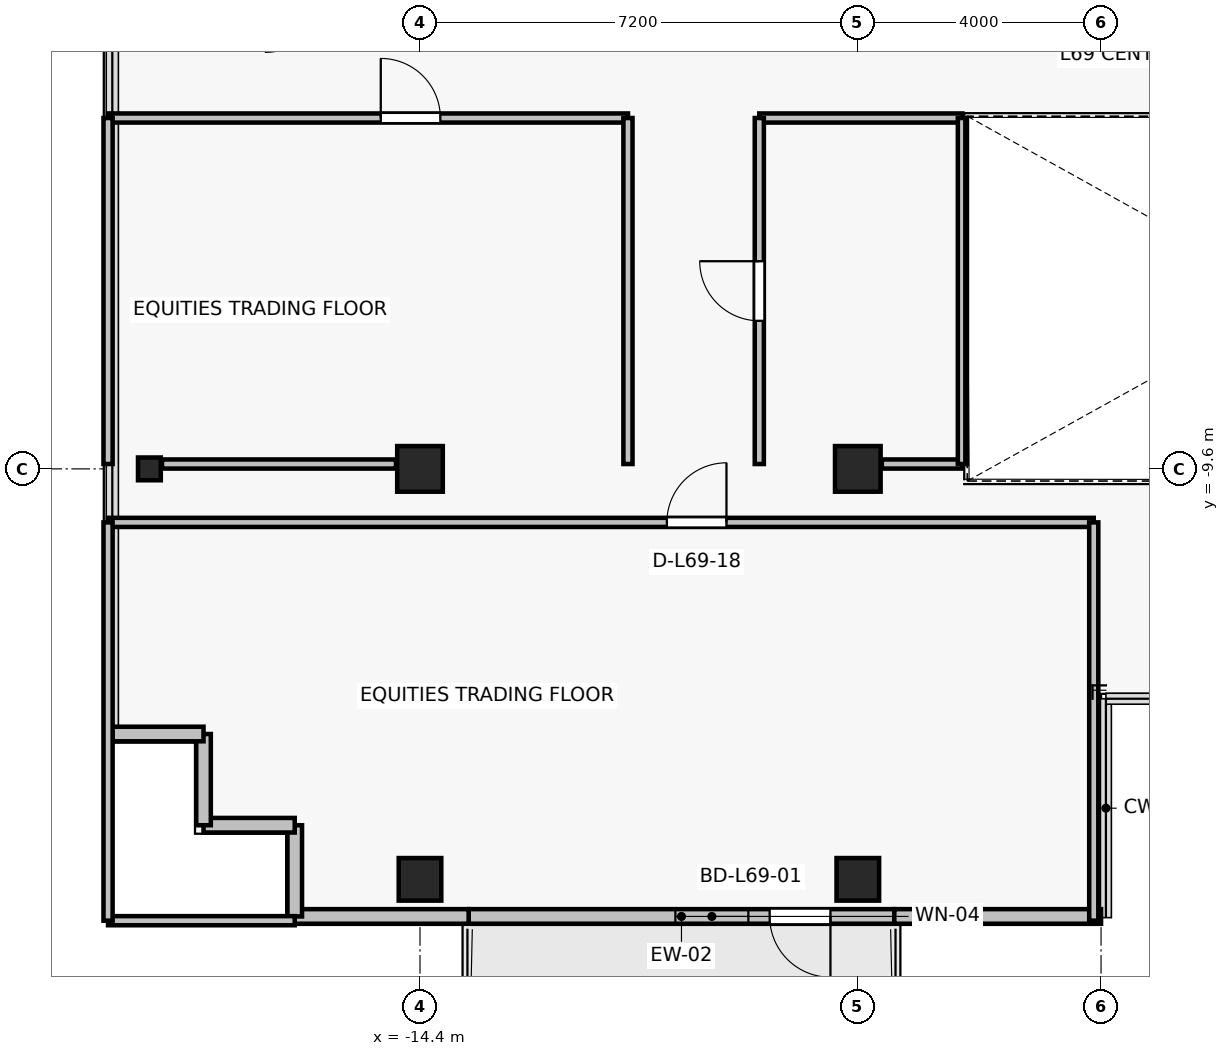
"""IFC4 building model, lengths in metres.
Left out: names, types, materials, properties, quantities, classifications, styles, units other than length and angle.
Written with IfcOpenShell. Run it as: python <this file> out.ifc"""

import sys

from ifc_helpers import new_model, si_unit, direction, frame, frame_2d, origin, origin_2d, place, context, subcontext, project, spatial, rectangle, i_section, extrude, source, transform, mapped, element, fill, save


model = new_model("IFC4")
c1 = context("Model", 3, precision=1e-05, world=origin(), true_north=direction((0.0, 1.0)))
c2 = subcontext(c1, "Body", "Model", "MODEL_VIEW")
j1 = project(units=[si_unit("LENGTHUNIT", "METRE"), si_unit("PLANEANGLEUNIT", "RADIAN")], contexts=[c1])
p1 = place(None, origin())
s1 = spatial("IfcSite", under=j1, at=p1, CompositionType="ELEMENT")
p2 = place(p1, origin())
s2 = spatial("IfcBuilding", under=s1, at=p2, CompositionType="ELEMENT")
p3 = place(p2, frame((0.0, 0.0, 245.2)))
s3 = spatial("IfcBuildingStorey", under=s2, at=p3, CompositionType="ELEMENT", Elevation=245.2)
for number, where, z_axis, x_axis in (
    (1, (-14.4, -9.6, 0.0), (0.0, 0.0, 1.0), (1.0, 0.0, 0.0)),
    (2, (-7.2, -9.6, 0.0), (0.0, 0.0, 1.0), (1.0, 0.0, 0.0)),
):
    element("IfcColumn", number, at=place(p3, frame(where, z_axis=z_axis, x_axis=x_axis)), inside=s3, PredefinedType="COLUMN", context=c2, shape_type="SweptSolid", body=[
        extrude(rectangle(XDim=0.75, YDim=0.75, at=origin_2d()), origin(), (0.0, 0.0, 1.0), 3.3),
    ])
for number, where, z_axis, x_axis in (
    (3, (-14.4, -16.35, 0.0), (0.0, 0.0, 1.0), (1.0, 0.0, 0.0)),
    (4, (-7.2, -16.35, 0.0), (0.0, 0.0, 1.0), (1.0, 0.0, 0.0)),
):
    element("IfcColumn", number, at=place(p3, frame(where, z_axis=z_axis, x_axis=x_axis)), inside=s3, PredefinedType="COLUMN", context=c2, shape_type="SweptSolid", body=[
        extrude(rectangle(XDim=0.7, YDim=0.7, at=origin_2d()), origin(), (0.0, 0.0, 1.0), 3.3),
    ])
p4 = place(p3, frame((-18.85, -9.6, 0.0), z_axis=(0.0, 0.0, 1.0), x_axis=(1.0, 0.0, 0.0)))
e5 = element("IfcColumn", 5, at=p4, inside=s3, PredefinedType="COLUMN", context=c2, shape_type="SweptSolid", body=[
    extrude(i_section(OverallWidth=0.375, OverallDepth=0.375, WebThickness=0.017, FlangeThickness=0.027, FilletRadius=0.015, at=origin_2d()), origin(), (0.0, 0.0, 1.0), 3.3),
])
p5 = place(p3, frame((-6.6, -16.96, 0.0), z_axis=(0.0, 0.0, 1.0), x_axis=(-1.0, 0.0, 0.0)))
e6 = element("IfcWall", 6, at=p5, inside=s3, PredefinedType="SOLIDWALL", context=c2, shape_type="SweptSolid", body=[
    extrude(rectangle(XDim=7.0, YDim=0.24, at=frame_2d((3.5, 0.0))), origin(), (0.0, 0.0, 1.0), 2.665),
])
p6 = place(p5, frame((1.05, 0.0, 0.0)))
e7 = element("IfcOpeningElement", 7, at=p6, cuts=e6, PredefinedType="OPENING", context=c2, shape_type="SweptSolid", body=[
    extrude(rectangle(XDim=1.0, YDim=2.2, at=frame_2d((0.5, 1.1))), frame((0.0, 0.13, 0.0), z_axis=(0.0, -1.0, 0.0), x_axis=(1.0, 0.0, 0.0)), (0.0, 0.0, 1.0), 0.26),
])
p7 = place(p5, frame((2.4, 0.0, 0.85)))
e8 = element("IfcOpeningElement", 8, at=p7, cuts=e6, PredefinedType="OPENING", context=c2, shape_type="SweptSolid", body=[
    extrude(rectangle(XDim=1.2, YDim=1.5, at=frame_2d((0.6, 0.75))), frame((0.0, 0.13, 0.0), z_axis=(0.0, -1.0, 0.0), x_axis=(1.0, 0.0, 0.0)), (0.0, 0.0, 1.0), 0.26),
])
p8 = place(p3, frame((-6.6, -16.96, 0.0), z_axis=(0.0, 0.0, 1.0), x_axis=(1.0, 0.0, 0.0)))
e9 = element("IfcWall", 9, at=p8, inside=s3, PredefinedType="SOLIDWALL", context=c2, shape_type="SweptSolid", body=[
    extrude(rectangle(XDim=3.4, YDim=0.24, at=frame_2d((1.7, 0.0))), origin(), (0.0, 0.0, 1.0), 3.075),
])
p9 = place(p3, frame((-16.46, -16.96, 0.0), z_axis=(0.0, 0.0, 1.0), x_axis=(1.0, 0.0, 0.0)))
e10 = element("IfcWall", 10, at=p9, inside=s3, PredefinedType="SOLIDWALL", context=c2, shape_type="SweptSolid", body=[
    extrude(rectangle(XDim=2.86, YDim=0.24, at=frame_2d((1.43, 0.0))), origin(), (0.0, 0.0, 1.0), 2.665),
])
for number, where, z_axis, x_axis in (
    (11, (-16.46, -15.46, 0.0), (0.0, 0.0, 1.0), (0.0, -1.0, 0.0)),
    (12, (-17.96, -15.46, 0.0), (0.0, 0.0, 1.0), (1.0, 0.0, 0.0)),
    (13, (-17.96, -13.96, 0.0), (0.0, 0.0, 1.0), (0.0, -1.0, 0.0)),
    (14, (-19.46, -13.96, 0.0), (0.0, 0.0, 1.0), (1.0, 0.0, 0.0)),
):
    element("IfcWall", number, at=place(p3, frame(where, z_axis=z_axis, x_axis=x_axis)), inside=s3, PredefinedType="SOLIDWALL", context=c2, shape_type="SweptSolid", body=[
        extrude(rectangle(XDim=1.5, YDim=0.24, at=frame_2d((0.75, 0.0))), origin(), (0.0, 0.0, 1.0), 3.075),
    ])
p10 = place(p3, frame((-14.795, -9.52, 0.0), z_axis=(0.0, 0.0, 1.0), x_axis=(-1.0, 0.0, 0.0)))
e15 = element("IfcWall", 15, at=p10, inside=s3, PredefinedType="PARTITIONING", context=c2, shape_type="SweptSolid", body=[
    extrude(rectangle(XDim=3.848, YDim=0.15, at=frame_2d((1.924, 0.0))), origin(), (0.0, 0.0, 1.0), 2.615),
])
p11 = place(p3, frame((-19.53, -3.83, 0.0), z_axis=(0.0, 0.0, 1.0), x_axis=(1.0, 0.0, 0.0)))
e16 = element("IfcWall", 16, at=p11, inside=s3, PredefinedType="PARTITIONING", context=c2, shape_type="SweptSolid", body=[
    extrude(rectangle(XDim=8.55, YDim=0.15, at=frame_2d((4.275, 0.0))), origin(), (0.0, 0.0, 1.0), 2.615),
])
p12 = place(p11, frame((4.485, 0.0, 0.0)))
e17 = element("IfcOpeningElement", 17, at=p12, cuts=e16, PredefinedType="OPENING", context=c2, shape_type="SweptSolid", body=[
    extrude(rectangle(XDim=0.98, YDim=2.15, at=frame_2d((0.49, 1.075))), frame((0.0, 0.085, 0.0), z_axis=(0.0, -1.0, 0.0), x_axis=(1.0, 0.0, 0.0)), (0.0, 0.0, 1.0), 0.17),
])
p13 = place(p3, frame((-19.53, -9.52, 0.0), z_axis=(0.0, 0.0, 1.0), x_axis=(0.0, 1.0, 0.0)))
e18 = element("IfcWall", 18, at=p13, inside=s3, PredefinedType="PARTITIONING", context=c2, shape_type="SweptSolid", body=[
    extrude(rectangle(XDim=5.69, YDim=0.15, at=frame_2d((2.845, 0.0))), origin(), (0.0, 0.0, 1.0), 2.665),
])
p14 = place(p3, frame((-10.98, -3.83, 0.0), z_axis=(0.0, 0.0, 1.0), x_axis=(0.0, -1.0, 0.0)))
e19 = element("IfcWall", 19, at=p14, inside=s3, PredefinedType="PARTITIONING", context=c2, shape_type="SweptSolid", body=[
    extrude(rectangle(XDim=5.69, YDim=0.15, at=frame_2d((2.845, 0.0))), origin(), (0.0, 0.0, 1.0), 2.615),
])
p15 = place(p3, frame((-16.46, -17.03, 0.0), z_axis=(0.0, 0.0, 1.0), x_axis=(-1.0, 0.0, 0.0)))
e20 = element("IfcWall", 20, at=p15, inside=s3, PredefinedType="PARTITIONING", context=c2, shape_type="SweptSolid", body=[
    extrude(rectangle(XDim=3.07, YDim=0.15, at=frame_2d((1.535, 0.0))), origin(), (0.0, 0.0, 1.0), 2.665),
])
p16 = place(p3, frame((-19.53, -10.48, 0.0), z_axis=(0.0, 0.0, 1.0), x_axis=(1.0, 0.0, 0.0)))
e21 = element("IfcWall", 21, at=p16, inside=s3, PredefinedType="PARTITIONING", context=c2, shape_type="SweptSolid", body=[
    extrude(rectangle(XDim=16.21, YDim=0.15, at=frame_2d((8.105, 0.0))), origin(), (0.0, 0.0, 1.0), 2.615),
])
p17 = place(p16, frame((9.19, 0.0, 0.0)))
e22 = element("IfcOpeningElement", 22, at=p17, cuts=e21, PredefinedType="OPENING", context=c2, shape_type="SweptSolid", body=[
    extrude(rectangle(XDim=0.98, YDim=2.15, at=frame_2d((0.49, 1.075))), frame((0.0, 0.085, 0.0), z_axis=(0.0, -1.0, 0.0), x_axis=(1.0, 0.0, 0.0)), (0.0, 0.0, 1.0), 0.17),
])
p18 = place(p3, frame((-19.53, -17.03, 0.0), z_axis=(0.0, 0.0, 1.0), x_axis=(0.0, 1.0, 0.0)))
e23 = element("IfcWall", 23, at=p18, inside=s3, PredefinedType="PARTITIONING", context=c2, shape_type="SweptSolid", body=[
    extrude(rectangle(XDim=6.55, YDim=0.15, at=frame_2d((3.275, 0.0))), origin(), (0.0, 0.0, 1.0), 3.075),
])
p19 = place(p3, frame((-3.32, -10.48, 0.0), z_axis=(0.0, 0.0, 1.0), x_axis=(0.0, -1.0, 0.0)))
e24 = element("IfcWall", 24, at=p19, inside=s3, PredefinedType="PARTITIONING", context=c2, shape_type="SweptSolid", body=[
    extrude(rectangle(XDim=6.55, YDim=0.15, at=frame_2d((3.275, 0.0))), origin(), (0.0, 0.0, 1.0), 2.615),
])
p20 = place(p3, frame((-5.48, -9.52, 0.0), z_axis=(0.0, 0.0, 1.0), x_axis=(-1.0, 0.0, 0.0)))
e25 = element("IfcWall", 25, at=p20, inside=s3, PredefinedType="PARTITIONING", context=c2, shape_type="SweptSolid", body=[
    extrude(rectangle(XDim=1.325, YDim=0.15, at=frame_2d((0.663, 0.0))), origin(), (0.0, 0.0, 1.0), 2.615),
])
p21 = place(p3, frame((-8.82, -3.83, 0.0), z_axis=(0.0, 0.0, 1.0), x_axis=(1.0, 0.0, 0.0)))
e26 = element("IfcWall", 26, at=p21, inside=s3, PredefinedType="PARTITIONING", context=c2, shape_type="SweptSolid", body=[
    extrude(rectangle(XDim=3.34, YDim=0.15, at=frame_2d((1.67, 0.0))), origin(), (0.0, 0.0, 1.0), 2.615),
])
p22 = place(p3, frame((-8.82, -9.52, 0.0), z_axis=(0.0, 0.0, 1.0), x_axis=(0.0, 1.0, 0.0)))
e27 = element("IfcWall", 27, at=p22, inside=s3, PredefinedType="PARTITIONING", context=c2, shape_type="SweptSolid", body=[
    extrude(rectangle(XDim=5.69, YDim=0.15, at=frame_2d((2.845, 0.0))), origin(), (0.0, 0.0, 1.0), 2.615),
])
p23 = place(p22, frame((2.355, 0.0, 0.0)))
e28 = element("IfcOpeningElement", 28, at=p23, cuts=e27, PredefinedType="OPENING", context=c2, shape_type="SweptSolid", body=[
    extrude(rectangle(XDim=0.98, YDim=2.15, at=frame_2d((0.49, 1.075))), frame((0.0, 0.085, 0.0), z_axis=(0.0, -1.0, 0.0), x_axis=(1.0, 0.0, 0.0)), (0.0, 0.0, 1.0), 0.17),
])
p24 = place(p3, frame((-5.48, -3.83, 0.0), z_axis=(0.0, 0.0, 1.0), x_axis=(0.0, -1.0, 0.0)))
e29 = element("IfcWall", 29, at=p24, inside=s3, PredefinedType="PARTITIONING", context=c2, shape_type="SweptSolid", body=[
    extrude(rectangle(XDim=5.69, YDim=0.15, at=frame_2d((2.845, 0.0))), origin(), (0.0, 0.0, 1.0), 2.615),
])
m1 = source(origin(), c2, "Body", "SweptSolid", [
    extrude(rectangle(XDim=1.0, YDim=2.2, at=frame_2d((0.5, 1.1))), frame((0.0, 0.025, 0.0), z_axis=(0.0, -1.0, 0.0), x_axis=(1.0, 0.0, 0.0)), (0.0, 0.0, 1.0), 0.05),
])
p25 = place(p6, origin())
e30 = element("IfcDoor", 30, at=p25, inside=s3, OperationType="SINGLE_SWING_LEFT", PredefinedType="DOOR", context=c2, shape_type="MappedRepresentation", body=[
    mapped(m1, transform((0.0, 0.0, 0.0), x_axis=(1.0, 0.0, 0.0), y_axis=(0.0, 1.0, 0.0), z_axis=(0.0, 0.0, 1.0), scale=1.0)),
])
fill(e7, e30)
m2 = source(origin(), c2, "Body", "SweptSolid", [
    extrude(rectangle(XDim=1.2, YDim=1.5, at=frame_2d((0.6, 0.75))), frame((0.0, 0.03, 0.0), z_axis=(0.0, -1.0, 0.0), x_axis=(1.0, 0.0, 0.0)), (0.0, 0.0, 1.0), 0.06),
])
p26 = place(p7, origin())
e31 = element("IfcWindow", 31, at=p26, inside=s3, PartitioningType="SINGLE_PANEL", PredefinedType="WINDOW", context=c2, shape_type="MappedRepresentation", body=[
    mapped(m2, transform((0.0, 0.0, 0.0), x_axis=(1.0, 0.0, 0.0), y_axis=(0.0, 1.0, 0.0), z_axis=(0.0, 0.0, 1.0), scale=1.0)),
])
fill(e8, e31)
m3 = source(origin(), c2, "Body", "SweptSolid", [
    extrude(rectangle(XDim=0.98, YDim=2.15, at=frame_2d((0.49, 1.075))), frame((0.0, 0.025, 0.0), z_axis=(0.0, -1.0, 0.0), x_axis=(1.0, 0.0, 0.0)), (0.0, 0.0, 1.0), 0.05),
])
p27 = place(p12, origin())
e32 = element("IfcDoor", 32, at=p27, inside=s3, OperationType="SINGLE_SWING_LEFT", PredefinedType="DOOR", context=c2, shape_type="MappedRepresentation", body=[
    mapped(m3, transform((0.0, 0.0, 0.0), x_axis=(1.0, 0.0, 0.0), y_axis=(0.0, 1.0, 0.0), z_axis=(0.0, 0.0, 1.0), scale=1.0)),
])
fill(e17, e32)
p28 = place(p17, origin())
e33 = element("IfcDoor", 33, at=p28, inside=s3, OperationType="SINGLE_SWING_RIGHT", PredefinedType="DOOR", context=c2, shape_type="MappedRepresentation", body=[
    mapped(m3, transform((0.0, 0.0, 0.0), x_axis=(1.0, 0.0, 0.0), y_axis=(0.0, 1.0, 0.0), z_axis=(0.0, 0.0, 1.0), scale=1.0)),
])
fill(e22, e33)
p29 = place(p23, origin())
e34 = element("IfcDoor", 34, at=p29, inside=s3, OperationType="SINGLE_SWING_RIGHT", PredefinedType="DOOR", context=c2, shape_type="MappedRepresentation", body=[
    mapped(m3, transform((0.0, 0.0, 0.0), x_axis=(1.0, 0.0, 0.0), y_axis=(0.0, 1.0, 0.0), z_axis=(0.0, 0.0, 1.0), scale=1.0)),
])
fill(e28, e34)
save(model, sys.argv[1])
